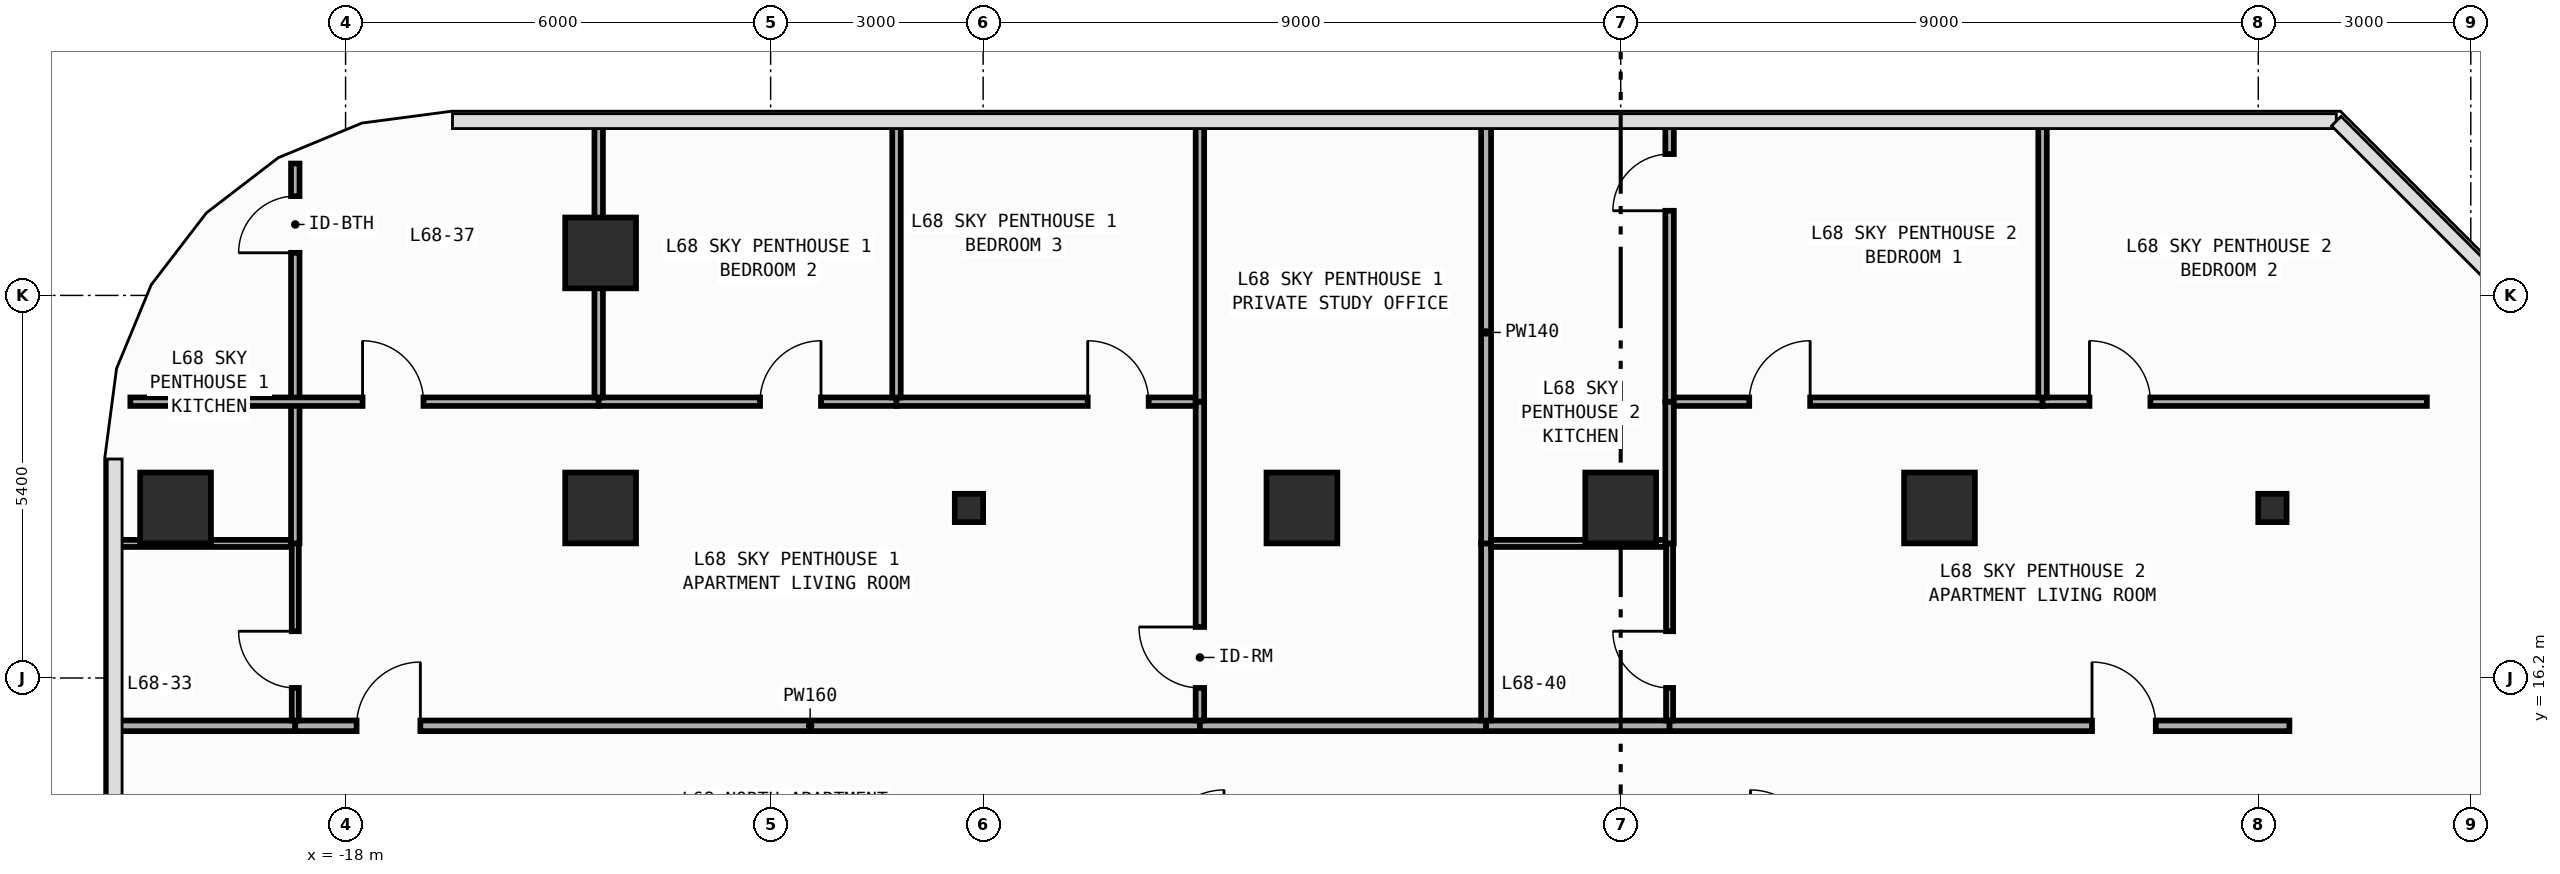
"""IFC4 building model, lengths in metres.
Left out: names, types, materials, properties, quantities, classifications, styles, units other than length and angle.
Written with IfcOpenShell. Run it as: python <this file> out.ifc"""

import sys

from ifc_helpers import new_model, si_unit, direction, frame, frame_2d, origin, origin_2d, place, context, subcontext, project, spatial, rectangle, circle, i_section, extrude, element, fill, save


model = new_model("IFC4")
c1 = context("Model", 3, precision=1e-05, world=origin(), true_north=direction((0.0, 1.0)))
c2 = subcontext(c1, "Body", "Model", "MODEL_VIEW")
j1 = project(units=[si_unit("LENGTHUNIT", "METRE"), si_unit("PLANEANGLEUNIT", "RADIAN")], contexts=[c1])
p1 = place(None, origin())
s1 = spatial("IfcSite", under=j1, at=p1, CompositionType="ELEMENT")
p2 = place(p1, origin())
s2 = spatial("IfcBuilding", under=s1, at=p2, CompositionType="ELEMENT")
p3 = place(p2, frame((0.0, 0.0, 285.2)))
s3 = spatial("IfcBuildingStorey", under=s2, at=p3, CompositionType="ELEMENT", Elevation=285.2)
for number, where, z_axis, x_axis in (
    (1, (-9.2, 18.6, 0.0), (0.0, 0.0, 1.0), (1.0, 0.0, 0.0)),
    (2, (9.2, 18.6, 0.0), (0.0, 0.0, 1.0), (1.0, 0.0, 0.0)),
):
    element("IfcColumn", number, at=place(p3, frame(where, z_axis=z_axis, x_axis=x_axis)), inside=s3, PredefinedType="COLUMN", context=c2, shape_type="SweptSolid", body=[
        extrude(i_section(OverallWidth=0.4, OverallDepth=0.4, WebThickness=0.013, FlangeThickness=0.021, FilletRadius=0.022, at=origin_2d()), origin(), (0.0, 0.0, 1.0), 3.8),
    ])
for number, where, z_axis, x_axis in (
    (3, (-20.4, 18.6, 0.0), (0.0, 0.0, 1.0), (1.0, 0.0, 0.0)),
    (4, (-14.4, 18.6, 0.0), (0.0, 0.0, 1.0), (1.0, 0.0, 0.0)),
    (5, (-4.5, 18.6, 0.0), (0.0, 0.0, 1.0), (1.0, 0.0, 0.0)),
    (6, (0.0, 18.6, 0.0), (0.0, 0.0, 1.0), (1.0, 0.0, 0.0)),
    (7, (4.5, 18.6, 0.0), (0.0, 0.0, 1.0), (1.0, 0.0, 0.0)),
    (8, (-14.4, 22.2, 0.0), (0.0, 0.0, 1.0), (1.0, 0.0, 0.0)),
):
    element("IfcColumn", number, at=place(p3, frame(where, z_axis=z_axis, x_axis=x_axis)), inside=s3, PredefinedType="COLUMN", context=c2, shape_type="SweptSolid", body=[
        extrude(circle(Radius=0.5, at=origin_2d()), origin(), (0.0, 0.0, 1.0), 3.8),
    ])
p4 = place(p3, frame((-21.255, 15.525, 0.0), z_axis=(0.0, 0.0, 1.0), x_axis=(1.0, 0.0, 0.0)))
e9 = element("IfcWall", 9, at=p4, inside=s3, PredefinedType="PARTITIONING", context=c2, shape_type="SweptSolid", body=[
    extrude(rectangle(XDim=2.545, YDim=0.15, at=frame_2d((1.272, 0.0))), origin(), (0.0, 0.0, 1.0), 3.54),
])
p5 = place(p3, frame((-18.71, 15.525, 0.0), z_axis=(0.0, 0.0, 1.0), x_axis=(1.0, 0.0, 0.0)))
e10 = element("IfcWall", 10, at=p5, inside=s3, PredefinedType="PARTITIONING", context=c2, shape_type="SweptSolid", body=[
    extrude(rectangle(XDim=12.77, YDim=0.15, at=frame_2d((6.385, 0.0))), origin(), (0.0, 0.0, 1.0), 3.54),
])
p6 = place(p5, frame((0.865, 0.0, 0.0)))
e11 = element("IfcOpeningElement", 11, at=p6, cuts=e10, PredefinedType="OPENING", context=c2, shape_type="SweptSolid", body=[
    extrude(rectangle(XDim=0.9, YDim=2.15, at=frame_2d((0.45, 1.075))), frame((0.0, 0.085, 0.0), z_axis=(0.0, -1.0, 0.0), x_axis=(1.0, 0.0, 0.0)), (0.0, 0.0, 1.0), 0.17),
])
p7 = place(p3, frame((-5.94, 15.525, 0.0), z_axis=(0.0, 0.0, 1.0), x_axis=(1.0, 0.0, 0.0)))
e12 = element("IfcWall", 12, at=p7, inside=s3, PredefinedType="PARTITIONING", context=c2, shape_type="SweptSolid", body=[
    extrude(rectangle(XDim=4.04, YDim=0.15, at=frame_2d((2.02, 0.0))), origin(), (0.0, 0.0, 1.0), 3.54),
])
p8 = place(p3, frame((-1.9, 15.525, 0.0), z_axis=(0.0, 0.0, 1.0), x_axis=(1.0, 0.0, 0.0)))
e13 = element("IfcWall", 13, at=p8, inside=s3, PredefinedType="PARTITIONING", context=c2, shape_type="SweptSolid", body=[
    extrude(rectangle(XDim=2.59, YDim=0.15, at=frame_2d((1.295, 0.0))), origin(), (0.0, 0.0, 1.0), 3.54),
])
p9 = place(p3, frame((0.69, 15.525, 0.0), z_axis=(0.0, 0.0, 1.0), x_axis=(1.0, 0.0, 0.0)))
e14 = element("IfcWall", 14, at=p9, inside=s3, PredefinedType="PARTITIONING", context=c2, shape_type="SweptSolid", body=[
    extrude(rectangle(XDim=8.75, YDim=0.15, at=frame_2d((4.375, 0.0))), origin(), (0.0, 0.0, 1.0), 3.54),
])
p10 = place(p9, frame((5.963, 0.0, 0.0)))
e15 = element("IfcOpeningElement", 15, at=p10, cuts=e14, PredefinedType="OPENING", context=c2, shape_type="SweptSolid", body=[
    extrude(rectangle(XDim=0.9, YDim=2.15, at=frame_2d((0.45, 1.075))), frame((0.0, 0.085, 0.0), z_axis=(0.0, -1.0, 0.0), x_axis=(1.0, 0.0, 0.0)), (0.0, 0.0, 1.0), 0.17),
])
p11 = place(p3, frame((-21.255, 18.1, 0.0), z_axis=(0.0, 0.0, 1.0), x_axis=(1.0, 0.0, 0.0)))
e16 = element("IfcWall", 16, at=p11, inside=s3, PredefinedType="PARTITIONING", context=c2, shape_type="SweptSolid", body=[
    extrude(rectangle(XDim=2.495, YDim=0.1, at=frame_2d((1.248, 0.0))), origin(), (0.0, 0.0, 1.0), 3.54),
])
p12 = place(p3, frame((-18.71, 15.6, 0.0), z_axis=(0.0, 0.0, 1.0), x_axis=(0.0, 1.0, 0.0)))
e17 = element("IfcWall", 17, at=p12, inside=s3, PredefinedType="PARTITIONING", context=c2, shape_type="SweptSolid", body=[
    extrude(rectangle(XDim=2.5, YDim=0.1, at=frame_2d((1.25, 0.0))), origin(), (0.0, 0.0, 1.0), 3.54),
])
p13 = place(p12, frame((0.46, 0.0, 0.0)))
e18 = element("IfcOpeningElement", 18, at=p13, cuts=e17, PredefinedType="OPENING", context=c2, shape_type="SweptSolid", body=[
    extrude(rectangle(XDim=0.8, YDim=2.1, at=frame_2d((0.4, 1.05))), frame((0.0, 0.06, 0.0), z_axis=(0.0, -1.0, 0.0), x_axis=(1.0, 0.0, 0.0)), (0.0, 0.0, 1.0), 0.12),
])
p14 = place(p3, frame((-18.71, 18.1, 0.0), z_axis=(0.0, 0.0, 1.0), x_axis=(0.0, 1.0, 0.0)))
e19 = element("IfcWall", 19, at=p14, inside=s3, PredefinedType="PARTITIONING", context=c2, shape_type="SweptSolid", body=[
    extrude(rectangle(XDim=2.0, YDim=0.12, at=frame_2d((1.0, 0.0))), origin(), (0.0, 0.0, 1.0), 3.54),
])
p15 = place(p3, frame((-18.71, 20.1, 0.0), z_axis=(0.0, 0.0, 1.0), x_axis=(0.0, 1.0, 0.0)))
e20 = element("IfcWall", 20, at=p15, inside=s3, PredefinedType="PARTITIONING", context=c2, shape_type="SweptSolid", body=[
    extrude(rectangle(XDim=3.361, YDim=0.12, at=frame_2d((1.681, 0.0))), origin(), (0.0, 0.0, 1.0), 3.54),
])
p16 = place(p15, frame((2.102, 0.0, 0.0)))
e21 = element("IfcOpeningElement", 21, at=p16, cuts=e20, PredefinedType="OPENING", context=c2, shape_type="SweptSolid", body=[
    extrude(rectangle(XDim=0.8, YDim=2.1, at=frame_2d((0.4, 1.05))), frame((0.0, 0.07, 0.0), z_axis=(0.0, -1.0, 0.0), x_axis=(1.0, 0.0, 0.0)), (0.0, 0.0, 1.0), 0.14),
])
p17 = place(p3, frame((-5.94, 15.6, 0.0), z_axis=(0.0, 0.0, 1.0), x_axis=(0.0, 1.0, 0.0)))
e22 = element("IfcWall", 22, at=p17, inside=s3, PredefinedType="PARTITIONING", context=c2, shape_type="SweptSolid", body=[
    extrude(rectangle(XDim=4.5, YDim=0.12, at=frame_2d((2.25, 0.0))), origin(), (0.0, 0.0, 1.0), 3.54),
])
p18 = place(p17, frame((0.46, 0.0, 0.0)))
e23 = element("IfcOpeningElement", 23, at=p18, cuts=e22, PredefinedType="OPENING", context=c2, shape_type="SweptSolid", body=[
    extrude(rectangle(XDim=0.86, YDim=2.15, at=frame_2d((0.43, 1.075))), frame((0.0, 0.07, 0.0), z_axis=(0.0, -1.0, 0.0), x_axis=(1.0, 0.0, 0.0)), (0.0, 0.0, 1.0), 0.14),
])
p19 = place(p3, frame((-21.039, 20.1, 0.0), z_axis=(0.0, 0.0, 1.0), x_axis=(1.0, 0.0, 0.0)))
e24 = element("IfcWall", 24, at=p19, inside=s3, PredefinedType="PARTITIONING", context=c2, shape_type="SweptSolid", body=[
    extrude(rectangle(XDim=6.612, YDim=0.12, at=frame_2d((3.306, 0.0))), origin(), (0.0, 0.0, 1.0), 3.54),
])
p20 = place(p19, frame((3.278, 0.0, 0.0)))
e25 = element("IfcOpeningElement", 25, at=p20, cuts=e24, PredefinedType="OPENING", context=c2, shape_type="SweptSolid", body=[
    extrude(rectangle(XDim=0.86, YDim=2.15, at=frame_2d((0.43, 1.075))), frame((0.0, 0.07, 0.0), z_axis=(0.0, -1.0, 0.0), x_axis=(1.0, 0.0, 0.0)), (0.0, 0.0, 1.0), 0.14),
])
p21 = place(p3, frame((-14.427, 20.1, 0.0), z_axis=(0.0, 0.0, 1.0), x_axis=(1.0, 0.0, 0.0)))
e26 = element("IfcWall", 26, at=p21, inside=s3, PredefinedType="PARTITIONING", context=c2, shape_type="SweptSolid", body=[
    extrude(rectangle(XDim=4.204, YDim=0.12, at=frame_2d((2.102, 0.0))), origin(), (0.0, 0.0, 1.0), 3.54),
])
p22 = place(p21, frame((2.278, 0.0, 0.0)))
e27 = element("IfcOpeningElement", 27, at=p22, cuts=e26, PredefinedType="OPENING", context=c2, shape_type="SweptSolid", body=[
    extrude(rectangle(XDim=0.86, YDim=2.15, at=frame_2d((0.43, 1.075))), frame((0.0, 0.07, 0.0), z_axis=(0.0, -1.0, 0.0), x_axis=(1.0, 0.0, 0.0)), (0.0, 0.0, 1.0), 0.14),
])
p23 = place(p3, frame((-10.223, 20.1, 0.0), z_axis=(0.0, 0.0, 1.0), x_axis=(1.0, 0.0, 0.0)))
e28 = element("IfcWall", 28, at=p23, inside=s3, PredefinedType="PARTITIONING", context=c2, shape_type="SweptSolid", body=[
    extrude(rectangle(XDim=4.223, YDim=0.12, at=frame_2d((2.111, 0.0))), origin(), (0.0, 0.0, 1.0), 3.54),
])
p24 = place(p23, frame((2.699, 0.0, 0.0)))
e29 = element("IfcOpeningElement", 29, at=p24, cuts=e28, PredefinedType="OPENING", context=c2, shape_type="SweptSolid", body=[
    extrude(rectangle(XDim=0.86, YDim=2.15, at=frame_2d((0.43, 1.075))), frame((0.0, 0.07, 0.0), z_axis=(0.0, -1.0, 0.0), x_axis=(1.0, 0.0, 0.0)), (0.0, 0.0, 1.0), 0.14),
])
p25 = place(p3, frame((-5.94, 20.1, 0.0), z_axis=(0.0, 0.0, 1.0), x_axis=(0.0, 1.0, 0.0)))
e30 = element("IfcWall", 30, at=p25, inside=s3, PredefinedType="PARTITIONING", context=c2, shape_type="SweptSolid", body=[
    extrude(rectangle(XDim=3.955, YDim=0.12, at=frame_2d((1.978, 0.0))), origin(), (0.0, 0.0, 1.0), 3.54),
])
p26 = place(p3, frame((-1.9, 15.6, 0.0), z_axis=(0.0, 0.0, 1.0), x_axis=(0.0, 1.0, 0.0)))
e31 = element("IfcWall", 31, at=p26, inside=s3, PredefinedType="PARTITIONING", context=c2, shape_type="SweptSolid", body=[
    extrude(rectangle(XDim=2.5, YDim=0.14, at=frame_2d((1.25, 0.0))), origin(), (0.0, 0.0, 1.0), 3.54),
])
p27 = place(p3, frame((-1.9, 18.1, 0.0), z_axis=(0.0, 0.0, 1.0), x_axis=(0.0, 1.0, 0.0)))
e32 = element("IfcWall", 32, at=p27, inside=s3, PredefinedType="PARTITIONING", context=c2, shape_type="SweptSolid", body=[
    extrude(rectangle(XDim=5.955, YDim=0.14, at=frame_2d((2.978, 0.0))), origin(), (0.0, 0.0, 1.0), 3.54),
])
p28 = place(p3, frame((-14.427, 20.16, 0.0), z_axis=(0.0, 0.0, 1.0), x_axis=(0.0, 1.0, 0.0)))
e33 = element("IfcWall", 33, at=p28, inside=s3, PredefinedType="PARTITIONING", context=c2, shape_type="SweptSolid", body=[
    extrude(rectangle(XDim=3.895, YDim=0.12, at=frame_2d((1.948, 0.0))), origin(), (0.0, 0.0, 1.0), 2.64),
])
p29 = place(p3, frame((-10.223, 20.16, 0.0), z_axis=(0.0, 0.0, 1.0), x_axis=(0.0, 1.0, 0.0)))
e34 = element("IfcWall", 34, at=p29, inside=s3, PredefinedType="PARTITIONING", context=c2, shape_type="SweptSolid", body=[
    extrude(rectangle(XDim=3.895, YDim=0.12, at=frame_2d((1.948, 0.0))), origin(), (0.0, 0.0, 1.0), 3.54),
])
p30 = place(p3, frame((-1.83, 18.1, 0.0), z_axis=(0.0, 0.0, 1.0), x_axis=(1.0, 0.0, 0.0)))
e35 = element("IfcWall", 35, at=p30, inside=s3, PredefinedType="PARTITIONING", context=c2, shape_type="SweptSolid", body=[
    extrude(rectangle(XDim=2.47, YDim=0.1, at=frame_2d((1.235, 0.0))), origin(), (0.0, 0.0, 1.0), 3.54),
])
p31 = place(p3, frame((0.69, 15.6, 0.0), z_axis=(0.0, 0.0, 1.0), x_axis=(0.0, 1.0, 0.0)))
e36 = element("IfcWall", 36, at=p31, inside=s3, PredefinedType="PARTITIONING", context=c2, shape_type="SweptSolid", body=[
    extrude(rectangle(XDim=2.5, YDim=0.1, at=frame_2d((1.25, 0.0))), origin(), (0.0, 0.0, 1.0), 3.54),
])
p32 = place(p31, frame((0.46, 0.0, 0.0)))
e37 = element("IfcOpeningElement", 37, at=p32, cuts=e36, PredefinedType="OPENING", context=c2, shape_type="SweptSolid", body=[
    extrude(rectangle(XDim=0.8, YDim=2.1, at=frame_2d((0.4, 1.05))), frame((0.0, 0.06, 0.0), z_axis=(0.0, -1.0, 0.0), x_axis=(1.0, 0.0, 0.0)), (0.0, 0.0, 1.0), 0.12),
])
p33 = place(p3, frame((0.69, 18.1, 0.0), z_axis=(0.0, 0.0, 1.0), x_axis=(0.0, 1.0, 0.0)))
e38 = element("IfcWall", 38, at=p33, inside=s3, PredefinedType="PARTITIONING", context=c2, shape_type="SweptSolid", body=[
    extrude(rectangle(XDim=2.0, YDim=0.12, at=frame_2d((1.0, 0.0))), origin(), (0.0, 0.0, 1.0), 3.54),
])
p34 = place(p3, frame((0.69, 20.1, 0.0), z_axis=(0.0, 0.0, 1.0), x_axis=(0.0, 1.0, 0.0)))
e39 = element("IfcWall", 39, at=p34, inside=s3, PredefinedType="PARTITIONING", context=c2, shape_type="SweptSolid", body=[
    extrude(rectangle(XDim=3.955, YDim=0.12, at=frame_2d((1.978, 0.0))), origin(), (0.0, 0.0, 1.0), 3.54),
])
p35 = place(p34, frame((2.695, 0.0, 0.0)))
e40 = element("IfcOpeningElement", 40, at=p35, cuts=e39, PredefinedType="OPENING", context=c2, shape_type="SweptSolid", body=[
    extrude(rectangle(XDim=0.8, YDim=2.1, at=frame_2d((0.4, 1.05))), frame((0.0, 0.07, 0.0), z_axis=(0.0, -1.0, 0.0), x_axis=(1.0, 0.0, 0.0)), (0.0, 0.0, 1.0), 0.14),
])
p36 = place(p3, frame((0.75, 20.1, 0.0), z_axis=(0.0, 0.0, 1.0), x_axis=(1.0, 0.0, 0.0)))
e41 = element("IfcWall", 41, at=p36, inside=s3, PredefinedType="PARTITIONING", context=c2, shape_type="SweptSolid", body=[
    extrude(rectangle(XDim=5.205, YDim=0.12, at=frame_2d((2.603, 0.0))), origin(), (0.0, 0.0, 1.0), 3.54),
])
p37 = place(p36, frame((1.064, 0.0, 0.0)))
e42 = element("IfcOpeningElement", 42, at=p37, cuts=e41, PredefinedType="OPENING", context=c2, shape_type="SweptSolid", body=[
    extrude(rectangle(XDim=0.86, YDim=2.15, at=frame_2d((0.43, 1.075))), frame((0.0, 0.07, 0.0), z_axis=(0.0, -1.0, 0.0), x_axis=(1.0, 0.0, 0.0)), (0.0, 0.0, 1.0), 0.14),
])
p38 = place(p3, frame((5.955, 20.1, 0.0), z_axis=(0.0, 0.0, 1.0), x_axis=(1.0, 0.0, 0.0)))
e43 = element("IfcWall", 43, at=p38, inside=s3, PredefinedType="PARTITIONING", context=c2, shape_type="SweptSolid", body=[
    extrude(rectangle(XDim=5.425, YDim=0.12, at=frame_2d((2.712, 0.0))), origin(), (0.0, 0.0, 1.0), 3.54),
])
p39 = place(p38, frame((0.663, 0.0, 0.0)))
e44 = element("IfcOpeningElement", 44, at=p39, cuts=e43, PredefinedType="OPENING", context=c2, shape_type="SweptSolid", body=[
    extrude(rectangle(XDim=0.86, YDim=2.15, at=frame_2d((0.43, 1.075))), frame((0.0, 0.07, 0.0), z_axis=(0.0, -1.0, 0.0), x_axis=(1.0, 0.0, 0.0)), (0.0, 0.0, 1.0), 0.14),
])
p40 = place(p3, frame((5.955, 20.16, 0.0), z_axis=(0.0, 0.0, 1.0), x_axis=(0.0, 1.0, 0.0)))
e45 = element("IfcWall", 45, at=p40, inside=s3, PredefinedType="PARTITIONING", context=c2, shape_type="SweptSolid", body=[
    extrude(rectangle(XDim=3.895, YDim=0.12, at=frame_2d((1.948, 0.0))), origin(), (0.0, 0.0, 1.0), 3.54),
])
p41 = place(p6, origin())
e46 = element("IfcDoor", 46, at=p41, inside=s3, OperationType="SINGLE_SWING_RIGHT", PredefinedType="DOOR", context=c2, shape_type="SweptSolid", body=[
    extrude(rectangle(XDim=0.9, YDim=2.15, at=frame_2d((0.45, 1.075))), frame((0.0, 0.025, 0.0), z_axis=(0.0, -1.0, 0.0), x_axis=(1.0, 0.0, 0.0)), (0.0, 0.0, 1.0), 0.05),
])
fill(e11, e46)
p42 = place(p10, origin())
e47 = element("IfcDoor", 47, at=p42, inside=s3, OperationType="SINGLE_SWING_LEFT", PredefinedType="DOOR", context=c2, shape_type="SweptSolid", body=[
    extrude(rectangle(XDim=0.9, YDim=2.15, at=frame_2d((0.45, 1.075))), frame((0.0, 0.025, 0.0), z_axis=(0.0, -1.0, 0.0), x_axis=(1.0, 0.0, 0.0)), (0.0, 0.0, 1.0), 0.05),
])
fill(e15, e47)
p43 = place(p13, origin())
e48 = element("IfcDoor", 48, at=p43, inside=s3, OperationType="SINGLE_SWING_RIGHT", PredefinedType="DOOR", context=c2, shape_type="SweptSolid", body=[
    extrude(rectangle(XDim=0.8, YDim=2.1, at=frame_2d((0.4, 1.05))), frame((0.0, 0.025, 0.0), z_axis=(0.0, -1.0, 0.0), x_axis=(1.0, 0.0, 0.0)), (0.0, 0.0, 1.0), 0.05),
])
fill(e18, e48)
p44 = place(p18, origin())
e49 = element("IfcDoor", 49, at=p44, inside=s3, OperationType="SINGLE_SWING_RIGHT", PredefinedType="DOOR", context=c2, shape_type="SweptSolid", body=[
    extrude(rectangle(XDim=0.86, YDim=2.15, at=frame_2d((0.43, 1.075))), frame((0.0, 0.025, 0.0), z_axis=(0.0, -1.0, 0.0), x_axis=(1.0, 0.0, 0.0)), (0.0, 0.0, 1.0), 0.05),
])
fill(e23, e49)
p45 = place(p20, origin())
e50 = element("IfcDoor", 50, at=p45, inside=s3, OperationType="SINGLE_SWING_LEFT", PredefinedType="DOOR", context=c2, shape_type="SweptSolid", body=[
    extrude(rectangle(XDim=0.86, YDim=2.15, at=frame_2d((0.43, 1.075))), frame((0.0, 0.025, 0.0), z_axis=(0.0, -1.0, 0.0), x_axis=(1.0, 0.0, 0.0)), (0.0, 0.0, 1.0), 0.05),
])
fill(e25, e50)
p46 = place(p22, origin())
e51 = element("IfcDoor", 51, at=p46, inside=s3, OperationType="SINGLE_SWING_RIGHT", PredefinedType="DOOR", context=c2, shape_type="SweptSolid", body=[
    extrude(rectangle(XDim=0.86, YDim=2.15, at=frame_2d((0.43, 1.075))), frame((0.0, 0.025, 0.0), z_axis=(0.0, -1.0, 0.0), x_axis=(1.0, 0.0, 0.0)), (0.0, 0.0, 1.0), 0.05),
])
fill(e27, e51)
p47 = place(p24, origin())
e52 = element("IfcDoor", 52, at=p47, inside=s3, OperationType="SINGLE_SWING_LEFT", PredefinedType="DOOR", context=c2, shape_type="SweptSolid", body=[
    extrude(rectangle(XDim=0.86, YDim=2.15, at=frame_2d((0.43, 1.075))), frame((0.0, 0.025, 0.0), z_axis=(0.0, -1.0, 0.0), x_axis=(1.0, 0.0, 0.0)), (0.0, 0.0, 1.0), 0.05),
])
fill(e29, e52)
p48 = place(p32, origin())
e53 = element("IfcDoor", 53, at=p48, inside=s3, OperationType="SINGLE_SWING_RIGHT", PredefinedType="DOOR", context=c2, shape_type="SweptSolid", body=[
    extrude(rectangle(XDim=0.8, YDim=2.1, at=frame_2d((0.4, 1.05))), frame((0.0, 0.025, 0.0), z_axis=(0.0, -1.0, 0.0), x_axis=(1.0, 0.0, 0.0)), (0.0, 0.0, 1.0), 0.05),
])
fill(e37, e53)
p49 = place(p37, origin())
e54 = element("IfcDoor", 54, at=p49, inside=s3, OperationType="SINGLE_SWING_RIGHT", PredefinedType="DOOR", context=c2, shape_type="SweptSolid", body=[
    extrude(rectangle(XDim=0.86, YDim=2.15, at=frame_2d((0.43, 1.075))), frame((0.0, 0.025, 0.0), z_axis=(0.0, -1.0, 0.0), x_axis=(1.0, 0.0, 0.0)), (0.0, 0.0, 1.0), 0.05),
])
fill(e42, e54)
p50 = place(p39, origin())
e55 = element("IfcDoor", 55, at=p50, inside=s3, OperationType="SINGLE_SWING_LEFT", PredefinedType="DOOR", context=c2, shape_type="SweptSolid", body=[
    extrude(rectangle(XDim=0.86, YDim=2.15, at=frame_2d((0.43, 1.075))), frame((0.0, 0.025, 0.0), z_axis=(0.0, -1.0, 0.0), x_axis=(1.0, 0.0, 0.0)), (0.0, 0.0, 1.0), 0.05),
])
fill(e44, e55)
p51 = place(p35, origin())
e56 = element("IfcDoor", 56, at=p51, inside=s3, OperationType="SINGLE_SWING_LEFT", PredefinedType="DOOR", context=c2, shape_type="SweptSolid", body=[
    extrude(rectangle(XDim=0.8, YDim=2.1, at=frame_2d((0.4, 1.05))), frame((0.0, 0.025, 0.0), z_axis=(0.0, -1.0, 0.0), x_axis=(1.0, 0.0, 0.0)), (0.0, 0.0, 1.0), 0.05),
])
fill(e40, e56)
p52 = place(p16, origin())
e57 = element("IfcDoor", 57, at=p52, inside=s3, OperationType="SINGLE_SWING_LEFT", PredefinedType="DOOR", context=c2, shape_type="SweptSolid", body=[
    extrude(rectangle(XDim=0.8, YDim=2.1, at=frame_2d((0.4, 1.05))), frame((0.0, 0.025, 0.0), z_axis=(0.0, -1.0, 0.0), x_axis=(1.0, 0.0, 0.0)), (0.0, 0.0, 1.0), 0.05),
])
fill(e21, e57)
save(model, sys.argv[1])
